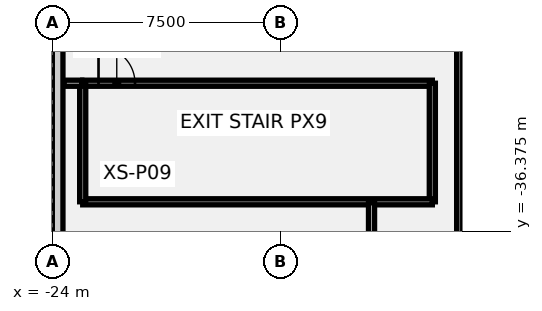
"""IFC4 building model, lengths in metres.
Left out: names, types, materials, properties, quantities, classifications, styles, units other than length and angle.
Written with IfcOpenShell. Run it as: python <this file> out.ifc"""

import sys

from ifc_helpers import new_model, si_unit, direction, frame, frame_2d, origin, place, context, subcontext, project, spatial, rectangle, extrude, element, fill, save


model = new_model("IFC4")
c1 = context("Model", 3, precision=1e-05, world=origin(), true_north=direction((0.0, 1.0)))
c2 = subcontext(c1, "Body", "Model", "MODEL_VIEW")
j1 = project(units=[si_unit("LENGTHUNIT", "METRE"), si_unit("PLANEANGLEUNIT", "RADIAN")], contexts=[c1])
p1 = place(None, origin())
s1 = spatial("IfcSite", under=j1, at=p1, CompositionType="ELEMENT")
p2 = place(p1, origin())
s2 = spatial("IfcBuilding", under=s1, at=p2, CompositionType="ELEMENT")
p3 = place(p2, frame((0.0, 0.0, 15.0)))
s3 = spatial("IfcBuildingStorey", under=s2, at=p3, CompositionType="ELEMENT", Elevation=15.0)
p4 = place(p3, frame((-23.0, -31.5, 0.0), z_axis=(0.0, 0.0, 1.0), x_axis=(1.0, 0.0, 0.0)))
e1 = element("IfcWall", 1, at=p4, inside=s3, PredefinedType="PARTITIONING", context=c2, shape_type="SweptSolid", body=[
    extrude(rectangle(XDim=11.5, YDim=0.2, at=frame_2d((5.75, 0.0))), origin(), (0.0, 0.0, 1.0), 4.5),
])
p5 = place(p4, frame((0.52, 0.0, 0.0)))
e2 = element("IfcOpeningElement", 2, at=p5, cuts=e1, PredefinedType="OPENING", context=c2, shape_type="SweptSolid", body=[
    extrude(rectangle(XDim=1.2, YDim=2.1, at=frame_2d((0.6, 1.05))), frame((0.0, 0.11, 0.0), z_axis=(0.0, -1.0, 0.0), x_axis=(1.0, 0.0, 0.0)), (0.0, 0.0, 1.0), 0.22),
])
p6 = place(p3, frame((-11.5, -35.4, 0.0), z_axis=(0.0, 0.0, 1.0), x_axis=(0.0, 1.0, 0.0)))
e3 = element("IfcWall", 3, at=p6, inside=s3, PredefinedType="PARTITIONING", context=c2, shape_type="SweptSolid", body=[
    extrude(rectangle(XDim=3.9, YDim=0.2, at=frame_2d((1.95, 0.0))), origin(), (0.0, 0.0, 1.0), 4.5),
])
p7 = place(p3, frame((-23.0, -35.4, 0.0), z_axis=(0.0, 0.0, 1.0), x_axis=(1.0, 0.0, 0.0)))
e4 = element("IfcWall", 4, at=p7, inside=s3, PredefinedType="PARTITIONING", context=c2, shape_type="SweptSolid", body=[
    extrude(rectangle(XDim=11.5, YDim=0.2, at=frame_2d((5.75, 0.0))), origin(), (0.0, 0.0, 1.0), 4.5),
])
p8 = place(p3, frame((-23.0, -35.4, 0.0), z_axis=(0.0, 0.0, 1.0), x_axis=(0.0, 1.0, 0.0)))
e5 = element("IfcWall", 5, at=p8, inside=s3, PredefinedType="PARTITIONING", context=c2, shape_type="SweptSolid", body=[
    extrude(rectangle(XDim=3.9, YDim=0.2, at=frame_2d((1.95, 0.0))), origin(), (0.0, 0.0, 1.0), 4.5),
])
p9 = place(p3, frame((-13.5, -40.5, 0.0), z_axis=(0.0, 0.0, 1.0), x_axis=(0.0, 1.0, 0.0)))
e6 = element("IfcWall", 6, at=p9, inside=s3, PredefinedType="PARTITIONING", context=c2, shape_type="SweptSolid", body=[
    extrude(rectangle(XDim=5.07, YDim=0.2, at=frame_2d((2.535, 0.0))), origin(), (0.0, 0.0, 1.0), 4.5),
])
p10 = place(p3, frame((-23.62, -31.5, 0.0), z_axis=(0.0, 0.0, 1.0), x_axis=(1.0, 0.0, 0.0)))
e7 = element("IfcWall", 7, at=p10, inside=s3, PredefinedType="PARTITIONING", context=c2, shape_type="SweptSolid", body=[
    extrude(rectangle(XDim=0.59, YDim=0.2, at=frame_2d((0.295, 0.0))), origin(), (0.0, 0.0, 1.0), 4.5),
])
p11 = place(p3, frame((-10.6, -28.8, 0.0), z_axis=(0.0, 0.0, 1.0), x_axis=(0.0, -1.0, 0.0)))
e8 = element("IfcWall", 8, at=p11, inside=s3, PredefinedType="SOLIDWALL", context=c2, shape_type="SweptSolid", body=[
    extrude(rectangle(XDim=9.7, YDim=0.2, at=frame_2d((4.85, 0.0))), origin(), (0.0, 0.0, 1.0), 4.5),
])
p12 = place(p3, frame((-23.825, -43.85, 0.0), z_axis=(0.0, 0.0, 1.0), x_axis=(0.0, 1.0, 0.0)))
e9 = element("IfcWall", 9, at=p12, inside=s3, PredefinedType="SOLIDWALL", context=c2, shape_type="SweptSolid", body=[
    extrude(rectangle(XDim=27.4, YDim=0.35, at=frame_2d((13.7, 0.0))), origin(), (0.0, 0.0, 1.0), 4.5),
])
p13 = place(p12, frame((14.9, 0.0, 1.0)))
e10 = element("IfcOpeningElement", 10, at=p13, cuts=e9, PredefinedType="OPENING", context=c2, shape_type="SweptSolid", body=[
    extrude(rectangle(XDim=2.4, YDim=1.8, at=frame_2d((1.2, 0.9))), frame((0.0, 0.185, 0.0), z_axis=(0.0, -1.0, 0.0), x_axis=(1.0, 0.0, 0.0)), (0.0, 0.0, 1.0), 0.37),
])
p14 = place(p5, origin())
e11 = element("IfcDoor", 11, at=p14, inside=s3, OperationType="SINGLE_SWING_LEFT", PredefinedType="DOOR", context=c2, shape_type="SweptSolid", body=[
    extrude(rectangle(XDim=1.2, YDim=2.1, at=frame_2d((0.6, 1.05))), frame((0.0, 0.025, 0.0), z_axis=(0.0, -1.0, 0.0), x_axis=(1.0, 0.0, 0.0)), (0.0, 0.0, 1.0), 0.05),
])
fill(e2, e11)
save(model, sys.argv[1])
